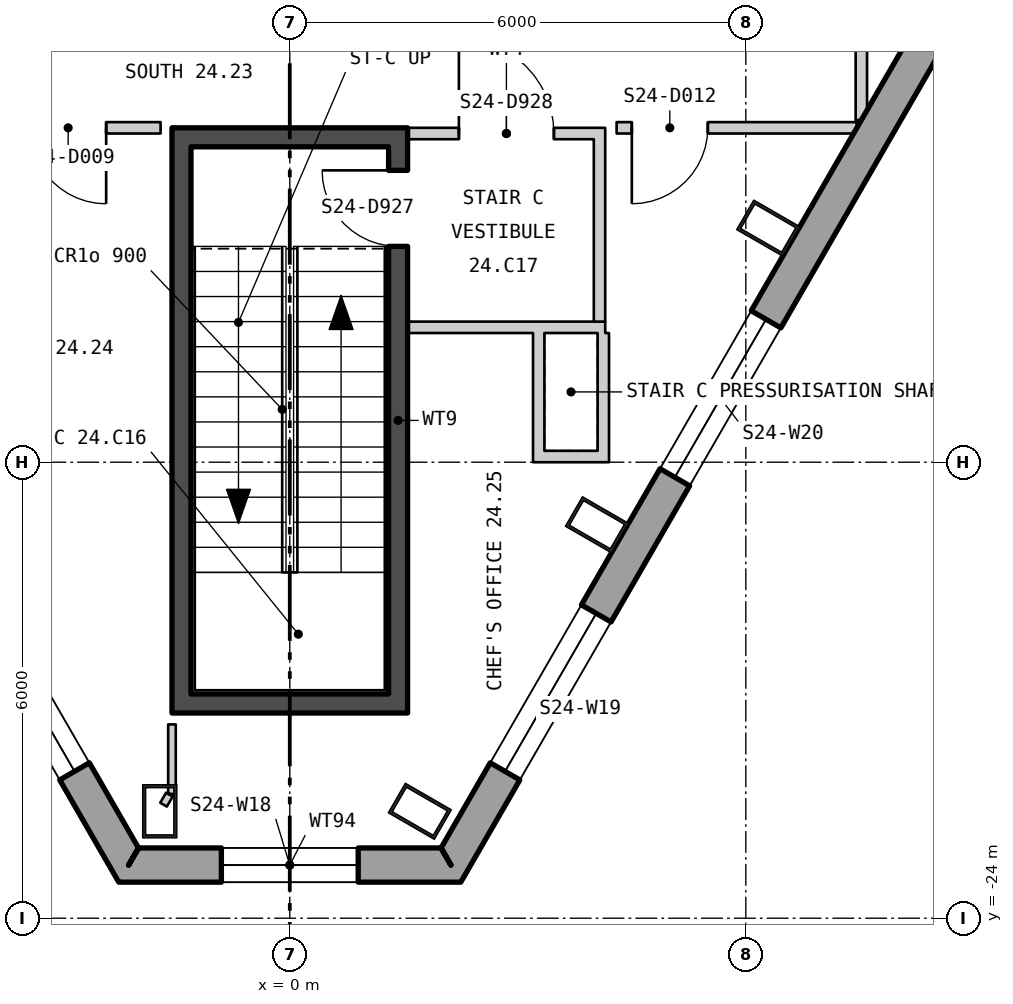
"""IFC4 building model, lengths in metres.
Left out: names, types, materials, properties, quantities, classifications, styles, units other than length and angle.
Written with IfcOpenShell. Run it as: python <this file> out.ifc"""

import sys

from ifc_helpers import new_model, si_unit, direction, frame, frame_2d, origin, origin_2d, place, context, subcontext, project, spatial, polyline, rectangle, hollow_rectangle, outline, extrude, element, fill, save


model = new_model("IFC4")
c1 = context("Model", 3, precision=1e-05, world=origin(), true_north=direction((0.0, 1.0)))
c2 = subcontext(c1, "Body", "Model", "MODEL_VIEW")
j1 = project(units=[si_unit("LENGTHUNIT", "METRE"), si_unit("PLANEANGLEUNIT", "RADIAN")], contexts=[c1])
p1 = place(None, origin())
s1 = spatial("IfcSite", under=j1, at=p1, CompositionType="ELEMENT")
p2 = place(p1, origin())
s2 = spatial("IfcBuilding", under=s1, at=p2, CompositionType="ELEMENT")
p3 = place(p2, frame((0.0, 0.0, 312.6)))
s3 = spatial("IfcBuildingStorey", under=s2, at=p3, CompositionType="ELEMENT", Elevation=312.6)
for number, where, z_axis, x_axis in (
    (1, (-1.711, -22.593, 0.0), (0.0, 0.0, 1.0), (1.0, 0.0, 0.0)),
    (2, (1.711, -22.593, 0.0), (0.0, 0.0, 1.0), (0.5, 0.866, 0.0)),
    (3, (4.041, -18.823, 0.0), (0.0, 0.0, 1.0), (0.5, 0.866, 0.0)),
    (4, (6.295, -14.92, 0.0), (0.0, 0.0, 1.0), (0.5, 0.866, 0.0)),
):
    element("IfcColumn", number, at=place(p3, frame(where, z_axis=z_axis, x_axis=x_axis)), inside=s3, PredefinedType="COLUMN", context=c2, shape_type="SweptSolid", body=[
        extrude(hollow_rectangle(XDim=0.45, YDim=0.7, WallThickness=0.04, at=origin_2d()), origin(), (0.0, 0.0, 1.0), 4.2),
    ])
p4 = place(p3, frame((-24.985, 16.303, -0.18), z_axis=(0.0, 0.0, 1.0), x_axis=(0.500000141277, -0.866025322218, 0.0)))
e5 = element("IfcWall", 5, at=p4, inside=s3, PredefinedType="SOLIDWALL", context=c2, shape_type="SweptSolid", body=[
    extrude(outline(polyline([(-0.13, -0.225), (45.86, -0.225), (45.6, 0.225), (0.13, 0.225), (-0.13, -0.225)])), origin(), (0.0, 0.0, 1.0), 3.98),
])
p5 = place(p4, frame((1.424, 0.0, 1.08)))
e6 = element("IfcOpeningElement", 6, at=p5, cuts=e5, PredefinedType="OPENING", context=c2, shape_type="SweptSolid", body=[
    extrude(rectangle(XDim=2.4, YDim=2.3, at=frame_2d((1.2, 1.15))), frame((0.0, 0.235, 0.0), z_axis=(0.0, -1.0, 0.0), x_axis=(1.0, 0.0, 0.0)), (0.0, 0.0, 1.0), 0.47),
])
p6 = place(p4, frame((5.892, 0.0, 1.08)))
e7 = element("IfcOpeningElement", 7, at=p6, cuts=e5, PredefinedType="OPENING", context=c2, shape_type="SweptSolid", body=[
    extrude(rectangle(XDim=2.4, YDim=2.3, at=frame_2d((1.2, 1.15))), frame((0.0, 0.235, 0.0), z_axis=(0.0, -1.0, 0.0), x_axis=(1.0, 0.0, 0.0)), (0.0, 0.0, 1.0), 0.47),
])
p7 = place(p4, frame((10.399, 0.0, 1.08)))
e8 = element("IfcOpeningElement", 8, at=p7, cuts=e5, PredefinedType="OPENING", context=c2, shape_type="SweptSolid", body=[
    extrude(rectangle(XDim=2.4, YDim=2.3, at=frame_2d((1.2, 1.15))), frame((0.0, 0.235, 0.0), z_axis=(0.0, -1.0, 0.0), x_axis=(1.0, 0.0, 0.0)), (0.0, 0.0, 1.0), 0.47),
])
p8 = place(p4, frame((14.905, 0.0, 1.08)))
e9 = element("IfcOpeningElement", 9, at=p8, cuts=e5, PredefinedType="OPENING", context=c2, shape_type="SweptSolid", body=[
    extrude(rectangle(XDim=2.4, YDim=2.3, at=frame_2d((1.2, 1.15))), frame((0.0, 0.235, 0.0), z_axis=(0.0, -1.0, 0.0), x_axis=(1.0, 0.0, 0.0)), (0.0, 0.0, 1.0), 0.47),
])
p9 = place(p4, frame((19.412, 0.0, 1.08)))
e10 = element("IfcOpeningElement", 10, at=p9, cuts=e5, PredefinedType="OPENING", context=c2, shape_type="SweptSolid", body=[
    extrude(rectangle(XDim=2.4, YDim=2.3, at=frame_2d((1.2, 1.15))), frame((0.0, 0.235, 0.0), z_axis=(0.0, -1.0, 0.0), x_axis=(1.0, 0.0, 0.0)), (0.0, 0.0, 1.0), 0.47),
])
p10 = place(p4, frame((23.918, 0.0, 1.08)))
e11 = element("IfcOpeningElement", 11, at=p10, cuts=e5, PredefinedType="OPENING", context=c2, shape_type="SweptSolid", body=[
    extrude(rectangle(XDim=2.4, YDim=2.3, at=frame_2d((1.2, 1.15))), frame((0.0, 0.235, 0.0), z_axis=(0.0, -1.0, 0.0), x_axis=(1.0, 0.0, 0.0)), (0.0, 0.0, 1.0), 0.47),
])
p11 = place(p4, frame((28.425, 0.0, 1.08)))
e12 = element("IfcOpeningElement", 12, at=p11, cuts=e5, PredefinedType="OPENING", context=c2, shape_type="SweptSolid", body=[
    extrude(rectangle(XDim=2.4, YDim=2.3, at=frame_2d((1.2, 1.15))), frame((0.0, 0.235, 0.0), z_axis=(0.0, -1.0, 0.0), x_axis=(1.0, 0.0, 0.0)), (0.0, 0.0, 1.0), 0.47),
])
p12 = place(p4, frame((37.438, 0.0, 1.08)))
e13 = element("IfcOpeningElement", 13, at=p12, cuts=e5, PredefinedType="OPENING", context=c2, shape_type="SweptSolid", body=[
    extrude(rectangle(XDim=2.4, YDim=2.3, at=frame_2d((1.2, 1.15))), frame((0.0, 0.235, 0.0), z_axis=(0.0, -1.0, 0.0), x_axis=(1.0, 0.0, 0.0)), (0.0, 0.0, 1.0), 0.47),
])
p13 = place(p4, frame((41.907, 0.0, 1.08)))
e14 = element("IfcOpeningElement", 14, at=p13, cuts=e5, PredefinedType="OPENING", context=c2, shape_type="SweptSolid", body=[
    extrude(rectangle(XDim=2.4, YDim=2.3, at=frame_2d((1.2, 1.15))), frame((0.0, 0.235, 0.0), z_axis=(0.0, -1.0, 0.0), x_axis=(1.0, 0.0, 0.0)), (0.0, 0.0, 1.0), 0.47),
])
p14 = place(p3, frame((-2.12, -23.301, -0.18), z_axis=(0.0, 0.0, 1.0), x_axis=(1.0, 0.0, 0.0)))
e15 = element("IfcWall", 15, at=p14, inside=s3, PredefinedType="SOLIDWALL", context=c2, shape_type="SweptSolid", body=[
    extrude(outline(polyline([(-0.13, -0.225), (4.37, -0.225), (4.11, 0.225), (0.13, 0.225), (-0.13, -0.225)])), origin(), (0.0, 0.0, 1.0), 3.98),
])
p15 = place(p14, frame((1.22, 0.0, 1.08)))
e16 = element("IfcOpeningElement", 16, at=p15, cuts=e15, PredefinedType="OPENING", context=c2, shape_type="SweptSolid", body=[
    extrude(rectangle(XDim=1.8, YDim=2.3, at=frame_2d((0.9, 1.15))), frame((0.0, 0.235, 0.0), z_axis=(0.0, -1.0, 0.0), x_axis=(1.0, 0.0, 0.0)), (0.0, 0.0, 1.0), 0.47),
])
p16 = place(p3, frame((2.12, -23.301, -0.18), z_axis=(0.0, 0.0, 1.0), x_axis=(0.500000141277, 0.866025322218, 0.0)))
e17 = element("IfcWall", 17, at=p16, inside=s3, PredefinedType="SOLIDWALL", context=c2, shape_type="SweptSolid", body=[
    extrude(outline(polyline([(-0.13, -0.225), (45.86, -0.225), (45.6, 0.225), (0.13, 0.225), (-0.13, -0.225)])), origin(), (0.0, 0.0, 1.0), 3.98),
])
p17 = place(p16, frame((1.424, 0.0, 1.08)))
e18 = element("IfcOpeningElement", 18, at=p17, cuts=e17, PredefinedType="OPENING", context=c2, shape_type="SweptSolid", body=[
    extrude(rectangle(XDim=2.4, YDim=2.3, at=frame_2d((1.2, 1.15))), frame((0.0, 0.235, 0.0), z_axis=(0.0, -1.0, 0.0), x_axis=(1.0, 0.0, 0.0)), (0.0, 0.0, 1.0), 0.47),
])
p18 = place(p16, frame((5.892, 0.0, 1.08)))
e19 = element("IfcOpeningElement", 19, at=p18, cuts=e17, PredefinedType="OPENING", context=c2, shape_type="SweptSolid", body=[
    extrude(rectangle(XDim=2.4, YDim=2.3, at=frame_2d((1.2, 1.15))), frame((0.0, 0.235, 0.0), z_axis=(0.0, -1.0, 0.0), x_axis=(1.0, 0.0, 0.0)), (0.0, 0.0, 1.0), 0.47),
])
p19 = place(p16, frame((14.905, 0.0, 1.08)))
e20 = element("IfcOpeningElement", 20, at=p19, cuts=e17, PredefinedType="OPENING", context=c2, shape_type="SweptSolid", body=[
    extrude(rectangle(XDim=2.4, YDim=2.3, at=frame_2d((1.2, 1.15))), frame((0.0, 0.235, 0.0), z_axis=(0.0, -1.0, 0.0), x_axis=(1.0, 0.0, 0.0)), (0.0, 0.0, 1.0), 0.47),
])
p20 = place(p16, frame((19.412, 0.0, 1.08)))
e21 = element("IfcOpeningElement", 21, at=p20, cuts=e17, PredefinedType="OPENING", context=c2, shape_type="SweptSolid", body=[
    extrude(rectangle(XDim=2.4, YDim=2.3, at=frame_2d((1.2, 1.15))), frame((0.0, 0.235, 0.0), z_axis=(0.0, -1.0, 0.0), x_axis=(1.0, 0.0, 0.0)), (0.0, 0.0, 1.0), 0.47),
])
p21 = place(p16, frame((23.918, 0.0, 1.08)))
e22 = element("IfcOpeningElement", 22, at=p21, cuts=e17, PredefinedType="OPENING", context=c2, shape_type="SweptSolid", body=[
    extrude(rectangle(XDim=2.4, YDim=2.3, at=frame_2d((1.2, 1.15))), frame((0.0, 0.235, 0.0), z_axis=(0.0, -1.0, 0.0), x_axis=(1.0, 0.0, 0.0)), (0.0, 0.0, 1.0), 0.47),
])
p22 = place(p16, frame((28.425, 0.0, 1.08)))
e23 = element("IfcOpeningElement", 23, at=p22, cuts=e17, PredefinedType="OPENING", context=c2, shape_type="SweptSolid", body=[
    extrude(rectangle(XDim=2.4, YDim=2.3, at=frame_2d((1.2, 1.15))), frame((0.0, 0.235, 0.0), z_axis=(0.0, -1.0, 0.0), x_axis=(1.0, 0.0, 0.0)), (0.0, 0.0, 1.0), 0.47),
])
p23 = place(p16, frame((37.438, 0.0, 1.08)))
e24 = element("IfcOpeningElement", 24, at=p23, cuts=e17, PredefinedType="OPENING", context=c2, shape_type="SweptSolid", body=[
    extrude(rectangle(XDim=2.4, YDim=2.3, at=frame_2d((1.2, 1.15))), frame((0.0, 0.235, 0.0), z_axis=(0.0, -1.0, 0.0), x_axis=(1.0, 0.0, 0.0)), (0.0, 0.0, 1.0), 0.47),
])
p24 = place(p16, frame((41.907, 0.0, 1.08)))
e25 = element("IfcOpeningElement", 25, at=p24, cuts=e17, PredefinedType="OPENING", context=c2, shape_type="SweptSolid", body=[
    extrude(rectangle(XDim=2.4, YDim=2.3, at=frame_2d((1.2, 1.15))), frame((0.0, 0.235, 0.0), z_axis=(0.0, -1.0, 0.0), x_axis=(1.0, 0.0, 0.0)), (0.0, 0.0, 1.0), 0.47),
])
p25 = place(p3, frame((-1.425, -21.05, 0.0), z_axis=(0.0, 0.0, 1.0), x_axis=(0.0, 1.0, 0.0)))
e26 = element("IfcWall", 26, at=p25, inside=s3, PredefinedType="SHEAR", context=c2, shape_type="SweptSolid", body=[
    extrude(rectangle(XDim=7.2, YDim=0.25, at=frame_2d((3.6, 0.0))), origin(), (0.0, 0.0, 1.0), 4.0),
])
p26 = place(p3, frame((1.425, -21.05, 0.0), z_axis=(0.0, 0.0, 1.0), x_axis=(0.0, 1.0, 0.0)))
e27 = element("IfcWall", 27, at=p26, inside=s3, PredefinedType="SHEAR", context=c2, shape_type="SweptSolid", body=[
    extrude(rectangle(XDim=7.2, YDim=0.25, at=frame_2d((3.6, 0.0))), origin(), (0.0, 0.0, 1.0), 4.0),
])
p27 = place(p26, frame((5.89, 0.0, 0.0)))
e28 = element("IfcOpeningElement", 28, at=p27, cuts=e27, PredefinedType="OPENING", context=c2, shape_type="SweptSolid", body=[
    extrude(rectangle(XDim=1.0, YDim=2.1, at=frame_2d((0.5, 1.05))), frame((0.0, 0.135, 0.0), z_axis=(0.0, -1.0, 0.0), x_axis=(1.0, 0.0, 0.0)), (0.0, 0.0, 1.0), 0.27),
])
for number, where, z_axis, x_axis in (
    (29, (-1.55, -21.175, 0.0), (0.0, 0.0, 1.0), (1.0, 0.0, 0.0)),
    (30, (-1.55, -13.725, 0.0), (0.0, 0.0, 1.0), (1.0, 0.0, 0.0)),
):
    element("IfcWall", number, at=place(p3, frame(where, z_axis=z_axis, x_axis=x_axis)), inside=s3, PredefinedType="SHEAR", context=c2, shape_type="SweptSolid", body=[
        extrude(rectangle(XDim=3.1, YDim=0.25, at=frame_2d((1.55, 0.0))), origin(), (0.0, 0.0, 1.0), 4.0),
    ])
p28 = place(p3, frame((1.55, -16.225, 0.0), z_axis=(0.0, 0.0, 1.0), x_axis=(1.0, 0.0, 0.0)))
e31 = element("IfcWall", 31, at=p28, inside=s3, PredefinedType="PARTITIONING", context=c2, shape_type="SweptSolid", body=[
    extrude(rectangle(XDim=2.6, YDim=0.15, at=frame_2d((1.3, 0.0))), origin(), (0.0, 0.0, 1.0), 4.0),
])
p29 = place(p3, frame((4.075, -16.15, 0.0), z_axis=(0.0, 0.0, 1.0), x_axis=(0.0, 1.0, 0.0)))
e32 = element("IfcWall", 32, at=p29, inside=s3, PredefinedType="PARTITIONING", context=c2, shape_type="SweptSolid", body=[
    extrude(rectangle(XDim=2.4, YDim=0.15, at=frame_2d((1.2, 0.0))), origin(), (0.0, 0.0, 1.0), 4.0),
])
p30 = place(p3, frame((1.55, -13.675, 0.0), z_axis=(0.0, 0.0, 1.0), x_axis=(1.0, 0.0, 0.0)))
e33 = element("IfcWall", 33, at=p30, inside=s3, PredefinedType="PARTITIONING", context=c2, shape_type="SweptSolid", body=[
    extrude(rectangle(XDim=2.6, YDim=0.15, at=frame_2d((1.3, 0.0))), origin(), (0.0, 0.0, 1.0), 3.21),
])
p31 = place(p30, frame((0.675, 0.0, 0.0)))
e34 = element("IfcOpeningElement", 34, at=p31, cuts=e33, PredefinedType="OPENING", context=c2, shape_type="SweptSolid", body=[
    extrude(rectangle(XDim=1.25, YDim=2.1, at=frame_2d((0.625, 1.05))), frame((0.0, 0.085, 0.0), z_axis=(0.0, -1.0, 0.0), x_axis=(1.0, 0.0, 0.0)), (0.0, 0.0, 1.0), 0.17),
])
p32 = place(p3, frame((3.275, -18.0, 0.0), z_axis=(0.0, 0.0, 1.0), x_axis=(0.0, 1.0, 0.0)))
e35 = element("IfcWall", 35, at=p32, inside=s3, PredefinedType="PARTITIONING", context=c2, shape_type="SweptSolid", body=[
    extrude(rectangle(XDim=1.7, YDim=0.15, at=frame_2d((0.85, 0.0))), origin(), (0.0, 0.0, 1.0), 3.55),
])
p33 = place(p3, frame((3.35, -17.925, 0.0), z_axis=(0.0, 0.0, 1.0), x_axis=(1.0, 0.0, 0.0)))
e36 = element("IfcWall", 36, at=p33, inside=s3, PredefinedType="PARTITIONING", context=c2, shape_type="SweptSolid", body=[
    extrude(rectangle(XDim=0.7, YDim=0.15, at=frame_2d((0.35, 0.0))), origin(), (0.0, 0.0, 1.0), 4.0),
])
p34 = place(p3, frame((4.125, -18.0, 0.0), z_axis=(0.0, 0.0, 1.0), x_axis=(0.0, 1.0, 0.0)))
e37 = element("IfcWall", 37, at=p34, inside=s3, PredefinedType="PARTITIONING", context=c2, shape_type="SweptSolid", body=[
    extrude(rectangle(XDim=1.7, YDim=0.15, at=frame_2d((0.85, 0.0))), origin(), (0.0, 0.0, 1.0), 4.0),
])
p35 = place(p3, frame((-6.855, -13.6, 0.0), z_axis=(0.0, 0.0, 1.0), x_axis=(1.0, 0.0, 0.0)))
e38 = element("IfcWall", 38, at=p35, inside=s3, PredefinedType="PARTITIONING", context=c2, shape_type="SweptSolid", body=[
    extrude(rectangle(XDim=5.155, YDim=0.15, at=frame_2d((2.578, 0.0))), origin(), (0.0, 0.0, 1.0), 3.21),
])
p36 = place(p35, frame((3.439, 0.0, 0.0)))
e39 = element("IfcOpeningElement", 39, at=p36, cuts=e38, PredefinedType="OPENING", context=c2, shape_type="SweptSolid", body=[
    extrude(rectangle(XDim=1.0, YDim=2.1, at=frame_2d((0.5, 1.05))), frame((0.0, 0.085, 0.0), z_axis=(0.0, -1.0, 0.0), x_axis=(1.0, 0.0, 0.0)), (0.0, 0.0, 1.0), 0.17),
])
p37 = place(p3, frame((-1.661, -22.506, 0.0), z_axis=(0.0, 0.0, 1.0), x_axis=(0.501036270542, 0.865426285481, 0.0)))
e40 = element("IfcWall", 40, at=p37, inside=s3, PredefinedType="PARTITIONING", context=c2, shape_type="SweptSolid", body=[
    extrude(rectangle(XDim=0.154, YDim=0.1, at=frame_2d((0.077, 0.0))), origin(), (0.0, 0.0, 1.0), 4.0),
])
p38 = place(p3, frame((-1.55, -22.364, 0.0), z_axis=(0.0, 0.0, 1.0), x_axis=(0.0, 1.0, 0.0)))
e41 = element("IfcWall", 41, at=p38, inside=s3, PredefinedType="PARTITIONING", context=c2, shape_type="SweptSolid", body=[
    extrude(rectangle(XDim=0.914, YDim=0.1, at=frame_2d((0.457, 0.0))), origin(), (0.0, 0.0, 1.0), 4.0),
])
p39 = place(p3, frame((4.3, -13.6, 0.0), z_axis=(0.0, 0.0, 1.0), x_axis=(1.0, 0.0, 0.0)))
e42 = element("IfcWall", 42, at=p39, inside=s3, PredefinedType="PARTITIONING", context=c2, shape_type="SweptSolid", body=[
    extrude(rectangle(XDim=2.555, YDim=0.15, at=frame_2d((1.278, 0.0))), origin(), (0.0, 0.0, 1.0), 3.21),
])
p40 = place(p39, frame((0.2, 0.0, 0.0)))
e43 = element("IfcOpeningElement", 43, at=p40, cuts=e42, PredefinedType="OPENING", context=c2, shape_type="SweptSolid", body=[
    extrude(rectangle(XDim=1.0, YDim=2.1, at=frame_2d((0.5, 1.05))), frame((0.0, 0.085, 0.0), z_axis=(0.0, -1.0, 0.0), x_axis=(1.0, 0.0, 0.0)), (0.0, 0.0, 1.0), 0.17),
])
p41 = place(p3, frame((6.855, -13.6, 0.0), z_axis=(0.0, 0.0, 1.0), x_axis=(1.0, 0.0, 0.0)))
e44 = element("IfcWall", 44, at=p41, inside=s3, PredefinedType="PARTITIONING", context=c2, shape_type="SweptSolid", body=[
    extrude(rectangle(XDim=0.606, YDim=0.15, at=frame_2d((0.303, 0.0))), origin(), (0.0, 0.0, 1.0), 4.0),
])
p42 = place(p3, frame((7.52, -13.498, 0.0), z_axis=(0.0, 0.0, 1.0), x_axis=(0.0, 1.0, 0.0)))
e45 = element("IfcWall", 45, at=p42, inside=s3, PredefinedType="PARTITIONING", context=c2, shape_type="SweptSolid", body=[
    extrude(rectangle(XDim=17.498, YDim=0.15, at=frame_2d((8.749, 0.0))), origin(), (0.0, 0.0, 1.0), 4.0),
])
p43 = place(p42, frame((3.639, 0.0, 0.0)))
e46 = element("IfcOpeningElement", 46, at=p43, cuts=e45, PredefinedType="OPENING", context=c2, shape_type="SweptSolid", body=[
    extrude(rectangle(XDim=1.0, YDim=2.1, at=frame_2d((0.5, 1.05))), frame((0.0, 0.085, 0.0), z_axis=(0.0, -1.0, 0.0), x_axis=(1.0, 0.0, 0.0)), (0.0, 0.0, 1.0), 0.17),
])
p44 = place(p42, frame((12.808, 0.0, 0.0)))
e47 = element("IfcOpeningElement", 47, at=p44, cuts=e45, PredefinedType="OPENING", context=c2, shape_type="SweptSolid", body=[
    extrude(rectangle(XDim=1.0, YDim=2.1, at=frame_2d((0.5, 1.05))), frame((0.0, 0.085, 0.0), z_axis=(0.0, -1.0, 0.0), x_axis=(1.0, 0.0, 0.0)), (0.0, 0.0, 1.0), 0.17),
])
p45 = place(p42, frame((16.098, 0.0, 0.0)))
e48 = element("IfcOpeningElement", 48, at=p45, cuts=e45, PredefinedType="OPENING", context=c2, shape_type="SweptSolid", body=[
    extrude(rectangle(XDim=1.0, YDim=2.1, at=frame_2d((0.5, 1.05))), frame((0.0, 0.085, 0.0), z_axis=(0.0, -1.0, 0.0), x_axis=(1.0, 0.0, 0.0)), (0.0, 0.0, 1.0), 0.17),
])
p46 = place(p13, origin())
e49 = element("IfcWindow", 49, at=p46, inside=s3, PartitioningType="SINGLE_PANEL", PredefinedType="WINDOW", context=c2, shape_type="SweptSolid", body=[
    extrude(rectangle(XDim=2.4, YDim=2.3, at=frame_2d((1.2, 1.15))), frame((0.0, 0.105, 0.0), z_axis=(0.0, -1.0, 0.0), x_axis=(1.0, 0.0, 0.0)), (0.0, 0.0, 1.0), 0.06),
])
fill(e14, e49)
p47 = place(p15, origin())
e50 = element("IfcWindow", 50, at=p47, inside=s3, PartitioningType="SINGLE_PANEL", PredefinedType="WINDOW", context=c2, shape_type="SweptSolid", body=[
    extrude(rectangle(XDim=1.8, YDim=2.3, at=frame_2d((0.9, 1.15))), frame((0.0, 0.105, 0.0), z_axis=(0.0, -1.0, 0.0), x_axis=(1.0, 0.0, 0.0)), (0.0, 0.0, 1.0), 0.06),
])
fill(e16, e50)
p48 = place(p17, origin())
e51 = element("IfcWindow", 51, at=p48, inside=s3, PartitioningType="SINGLE_PANEL", PredefinedType="WINDOW", context=c2, shape_type="SweptSolid", body=[
    extrude(rectangle(XDim=2.4, YDim=2.3, at=frame_2d((1.2, 1.15))), frame((0.0, 0.105, 0.0), z_axis=(0.0, -1.0, 0.0), x_axis=(1.0, 0.0, 0.0)), (0.0, 0.0, 1.0), 0.06),
])
fill(e18, e51)
p49 = place(p18, origin())
e52 = element("IfcWindow", 52, at=p49, inside=s3, PartitioningType="SINGLE_PANEL", PredefinedType="WINDOW", context=c2, shape_type="SweptSolid", body=[
    extrude(rectangle(XDim=2.4, YDim=2.3, at=frame_2d((1.2, 1.15))), frame((0.0, 0.105, 0.0), z_axis=(0.0, -1.0, 0.0), x_axis=(1.0, 0.0, 0.0)), (0.0, 0.0, 1.0), 0.06),
])
fill(e19, e52)
p50 = place(p27, origin())
e53 = element("IfcDoor", 53, at=p50, inside=s3, OperationType="SINGLE_SWING_LEFT", PredefinedType="DOOR", context=c2, shape_type="SweptSolid", body=[
    extrude(rectangle(XDim=1.0, YDim=2.1, at=frame_2d((0.5, 1.05))), frame((0.0, 0.025, 0.0), z_axis=(0.0, -1.0, 0.0), x_axis=(1.0, 0.0, 0.0)), (0.0, 0.0, 1.0), 0.05),
])
fill(e28, e53)
p51 = place(p31, origin())
e54 = element("IfcDoor", 54, at=p51, inside=s3, OperationType="SINGLE_SWING_RIGHT", PredefinedType="DOOR", context=c2, shape_type="SweptSolid", body=[
    extrude(rectangle(XDim=1.25, YDim=2.1, at=frame_2d((0.625, 1.05))), frame((0.0, 0.025, 0.0), z_axis=(0.0, -1.0, 0.0), x_axis=(1.0, 0.0, 0.0)), (0.0, 0.0, 1.0), 0.05),
])
fill(e34, e54)
p52 = place(p36, origin())
e55 = element("IfcDoor", 55, at=p52, inside=s3, OperationType="SINGLE_SWING_RIGHT", PredefinedType="DOOR", context=c2, shape_type="SweptSolid", body=[
    extrude(rectangle(XDim=1.0, YDim=2.1, at=frame_2d((0.5, 1.05))), frame((0.0, 0.025, 0.0), z_axis=(0.0, -1.0, 0.0), x_axis=(1.0, 0.0, 0.0)), (0.0, 0.0, 1.0), 0.05),
])
fill(e39, e55)
p53 = place(p40, origin())
e56 = element("IfcDoor", 56, at=p53, inside=s3, OperationType="SINGLE_SWING_LEFT", PredefinedType="DOOR", context=c2, shape_type="SweptSolid", body=[
    extrude(rectangle(XDim=1.0, YDim=2.1, at=frame_2d((0.5, 1.05))), frame((0.0, 0.025, 0.0), z_axis=(0.0, -1.0, 0.0), x_axis=(1.0, 0.0, 0.0)), (0.0, 0.0, 1.0), 0.05),
])
fill(e43, e56)
save(model, sys.argv[1])
